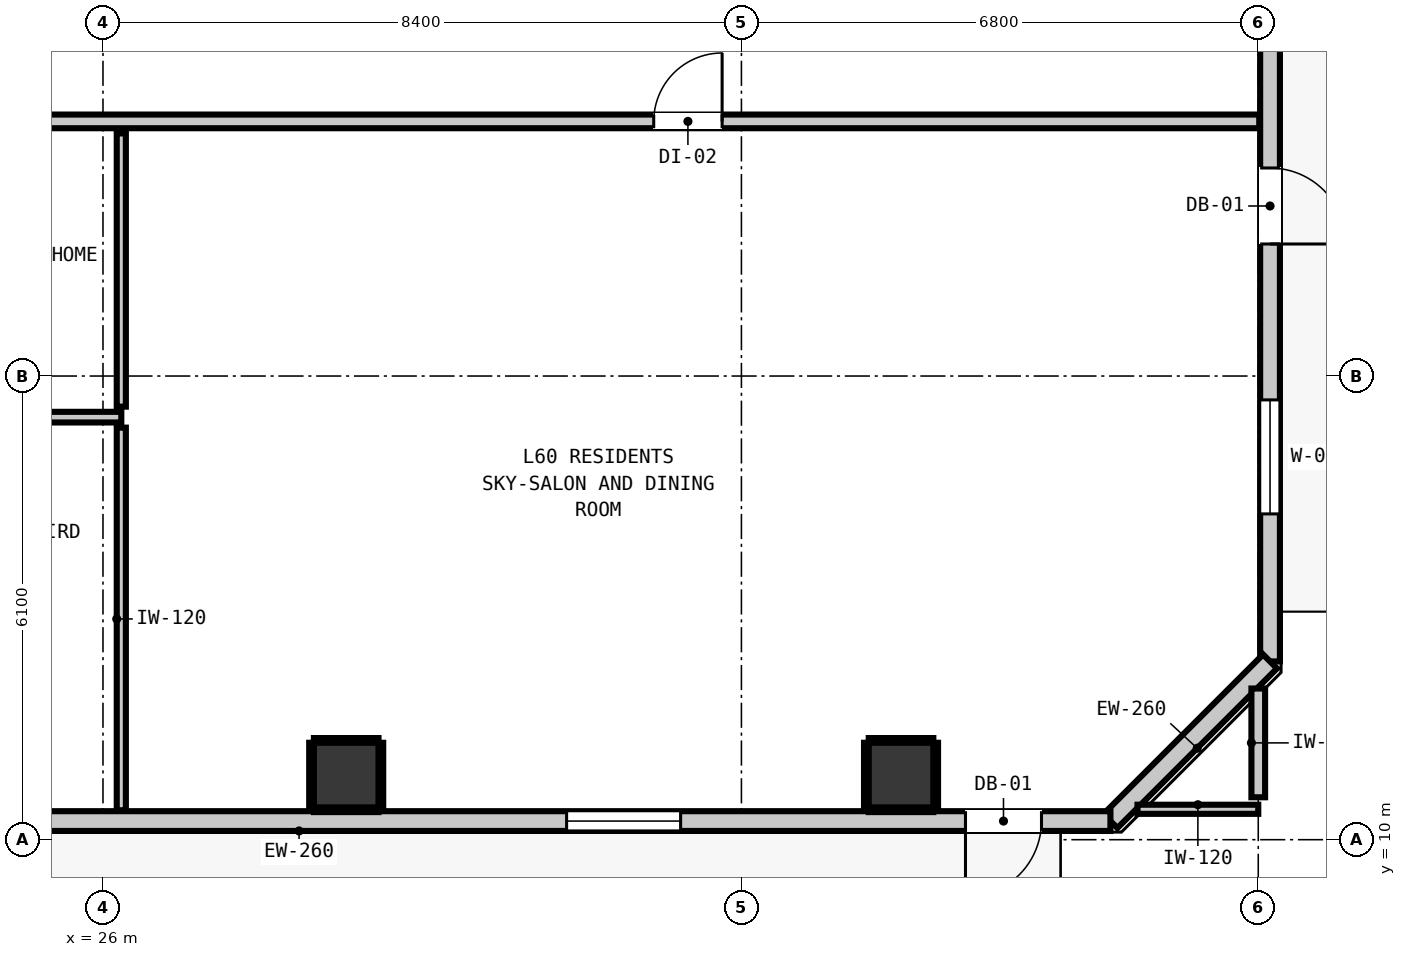
"""IFC4 building model, lengths in metres.
Left out: names, types, materials, properties, quantities, classifications, styles, units other than length and angle.
Written with IfcOpenShell. Run it as: python <this file> out.ifc"""

import sys

from ifc_helpers import new_model, si_unit, direction, frame, frame_2d, origin, origin_2d, place, context, subcontext, project, spatial, rectangle, extrude, element, fill, save


model = new_model("IFC4")
c1 = context("Model", 3, precision=1e-05, world=origin(), true_north=direction((0.0, 1.0)))
c2 = subcontext(c1, "Body", "Model", "MODEL_VIEW")
j1 = project(units=[si_unit("LENGTHUNIT", "METRE"), si_unit("PLANEANGLEUNIT", "RADIAN")], contexts=[c1])
p1 = place(None, origin())
s1 = spatial("IfcSite", under=j1, at=p1, CompositionType="ELEMENT")
p2 = place(p1, origin())
s2 = spatial("IfcBuilding", under=s1, at=p2, CompositionType="ELEMENT")
p3 = place(p2, frame((0.0, 0.0, 206.76)))
s3 = spatial("IfcBuildingStorey", under=s2, at=p3, CompositionType="ELEMENT", Elevation=206.76)
for number, where, z_axis, x_axis in (
    (1, (29.2, 10.85, 0.0), (0.0, 0.0, 1.0), (1.0, 0.0, 0.0)),
    (2, (36.5, 10.85, 0.0), (0.0, 0.0, 1.0), (1.0, 0.0, 0.0)),
):
    element("IfcColumn", number, at=place(p3, frame(where, z_axis=z_axis, x_axis=x_axis)), inside=s3, PredefinedType="COLUMN", context=c2, shape_type="SweptSolid", body=[
        extrude(rectangle(XDim=0.85, YDim=0.85, at=origin_2d()), origin(), (0.0, 0.0, 1.0), 2.9),
    ])
p4 = place(p3, frame((41.355, 42.655, 0.0), z_axis=(0.0, 0.0, 1.0), x_axis=(0.0, -1.0, 0.0)))
e3 = element("IfcWall", 3, at=p4, inside=s3, PredefinedType="STANDARD", context=c2, shape_type="SweptSolid", body=[
    extrude(rectangle(XDim=30.31, YDim=0.26, at=frame_2d((15.155, 0.0))), origin(), (0.0, 0.0, 1.0), 2.9),
])
p5 = place(p4, frame((23.818, 0.0, 0.0)))
e4 = element("IfcOpeningElement", 4, at=p5, cuts=e3, PredefinedType="OPENING", context=c2, shape_type="SweptSolid", body=[
    extrude(rectangle(XDim=1.0, YDim=2.15, at=frame_2d((0.5, 1.075))), frame((0.0, 0.14, 0.0), z_axis=(0.0, -1.0, 0.0), x_axis=(1.0, 0.0, 0.0)), (0.0, 0.0, 1.0), 0.28),
])
p6 = place(p4, frame((26.869, 0.0, 0.85)))
e5 = element("IfcOpeningElement", 5, at=p6, cuts=e3, PredefinedType="OPENING", context=c2, shape_type="SweptSolid", body=[
    extrude(rectangle(XDim=1.5, YDim=1.8, at=frame_2d((0.75, 0.9))), frame((0.0, 0.14, 0.0), z_axis=(0.0, -1.0, 0.0), x_axis=(1.0, 0.0, 0.0)), (0.0, 0.0, 1.0), 0.28),
])
p7 = place(p3, frame((41.355, 12.345, 0.0), z_axis=(0.0, 0.0, 1.0), x_axis=(-0.707147883682, -0.707065676302, 0.0)))
e6 = element("IfcWall", 6, at=p7, inside=s3, PredefinedType="STANDARD", context=c2, shape_type="SweptSolid", body=[
    extrude(rectangle(XDim=2.97, YDim=0.26, at=frame_2d((1.485, 0.0))), origin(), (0.0, 0.0, 1.0), 2.9),
])
p8 = place(p3, frame((39.255, 10.245, 0.0), z_axis=(0.0, 0.0, 1.0), x_axis=(-1.0, 0.0, 0.0)))
e7 = element("IfcWall", 7, at=p8, inside=s3, PredefinedType="STANDARD", context=c2, shape_type="SweptSolid", body=[
    extrude(rectangle(XDim=32.71, YDim=0.26, at=frame_2d((16.355, 0.0))), origin(), (0.0, 0.0, 1.0), 2.9),
])
p9 = place(p8, frame((0.907, 0.0, 0.0)))
e8 = element("IfcOpeningElement", 8, at=p9, cuts=e7, PredefinedType="OPENING", context=c2, shape_type="SweptSolid", body=[
    extrude(rectangle(XDim=1.0, YDim=2.15, at=frame_2d((0.5, 1.075))), frame((0.0, 0.14, 0.0), z_axis=(0.0, -1.0, 0.0), x_axis=(1.0, 0.0, 0.0)), (0.0, 0.0, 1.0), 0.28),
])
p10 = place(p8, frame((27.179, 0.0, 0.85)))
e9 = element("IfcOpeningElement", 9, at=p10, cuts=e7, PredefinedType="OPENING", context=c2, shape_type="SweptSolid", body=[
    extrude(rectangle(XDim=1.5, YDim=1.8, at=frame_2d((0.75, 0.9))), frame((0.0, 0.14, 0.0), z_axis=(0.0, -1.0, 0.0), x_axis=(1.0, 0.0, 0.0)), (0.0, 0.0, 1.0), 0.28),
])
p11 = place(p8, frame((30.449, 0.0, 0.85)))
e10 = element("IfcOpeningElement", 10, at=p11, cuts=e7, PredefinedType="OPENING", context=c2, shape_type="SweptSolid", body=[
    extrude(rectangle(XDim=1.5, YDim=1.8, at=frame_2d((0.75, 0.9))), frame((0.0, 0.14, 0.0), z_axis=(0.0, -1.0, 0.0), x_axis=(1.0, 0.0, 0.0)), (0.0, 0.0, 1.0), 0.28),
])
p12 = place(p8, frame((20.233, 0.0, 0.85)))
e11 = element("IfcOpeningElement", 11, at=p12, cuts=e7, PredefinedType="OPENING", context=c2, shape_type="SweptSolid", body=[
    extrude(rectangle(XDim=1.5, YDim=1.8, at=frame_2d((0.75, 0.9))), frame((0.0, 0.14, 0.0), z_axis=(0.0, -1.0, 0.0), x_axis=(1.0, 0.0, 0.0)), (0.0, 0.0, 1.0), 0.28),
])
p13 = place(p8, frame((14.195, 0.0, 0.85)))
e12 = element("IfcOpeningElement", 12, at=p13, cuts=e7, PredefinedType="OPENING", context=c2, shape_type="SweptSolid", body=[
    extrude(rectangle(XDim=1.5, YDim=1.8, at=frame_2d((0.75, 0.9))), frame((0.0, 0.14, 0.0), z_axis=(0.0, -1.0, 0.0), x_axis=(1.0, 0.0, 0.0)), (0.0, 0.0, 1.0), 0.28),
])
p14 = place(p8, frame((5.655, 0.0, 0.85)))
e13 = element("IfcOpeningElement", 13, at=p14, cuts=e7, PredefinedType="OPENING", context=c2, shape_type="SweptSolid", body=[
    extrude(rectangle(XDim=1.5, YDim=1.8, at=frame_2d((0.75, 0.9))), frame((0.0, 0.14, 0.0), z_axis=(0.0, -1.0, 0.0), x_axis=(1.0, 0.0, 0.0)), (0.0, 0.0, 1.0), 0.28),
])
p15 = place(p3, frame((4.587, 19.45, 0.0), z_axis=(0.0, 0.0, 1.0), x_axis=(1.0, 0.0, 0.0)))
e14 = element("IfcWall", 14, at=p15, inside=s3, PredefinedType="PARTITIONING", context=c2, shape_type="SweptSolid", body=[
    extrude(rectangle(XDim=36.626, YDim=0.18, at=frame_2d((18.313, 0.0))), origin(), (0.0, 0.0, 1.0), 2.9),
])
p16 = place(p15, frame((7.096, 0.0, 0.0)))
e15 = element("IfcOpeningElement", 15, at=p16, cuts=e14, PredefinedType="OPENING", context=c2, shape_type="SweptSolid", body=[
    extrude(rectangle(XDim=1.0, YDim=2.15, at=frame_2d((0.5, 1.075))), frame((0.0, 0.1, 0.0), z_axis=(0.0, -1.0, 0.0), x_axis=(1.0, 0.0, 0.0)), (0.0, 0.0, 1.0), 0.2),
])
p17 = place(p15, frame((28.659, 0.0, 0.0)))
e16 = element("IfcOpeningElement", 16, at=p17, cuts=e14, PredefinedType="OPENING", context=c2, shape_type="SweptSolid", body=[
    extrude(rectangle(XDim=0.9, YDim=2.1, at=frame_2d((0.45, 1.05))), frame((0.0, 0.1, 0.0), z_axis=(0.0, -1.0, 0.0), x_axis=(1.0, 0.0, 0.0)), (0.0, 0.0, 1.0), 0.2),
])
p18 = place(p3, frame((16.069, 15.559, 0.0), z_axis=(0.0, 0.0, 1.0), x_axis=(1.0, 0.0, 0.0)))
e17 = element("IfcWall", 17, at=p18, inside=s3, PredefinedType="PARTITIONING", context=c2, shape_type="SweptSolid", body=[
    extrude(rectangle(XDim=10.172, YDim=0.14, at=frame_2d((5.086, 0.0))), origin(), (0.0, 0.0, 1.0), 2.9),
])
p19 = place(p3, frame((39.611, 10.4, 0.0), z_axis=(0.0, 0.0, 1.0), x_axis=(1.0, 0.0, 0.0)))
e18 = element("IfcWall", 18, at=p19, inside=s3, PredefinedType="PARTITIONING", context=c2, shape_type="SweptSolid", body=[
    extrude(rectangle(XDim=1.589, YDim=0.12, at=frame_2d((0.794, 0.0))), origin(), (0.0, 0.0, 1.0), 2.9),
])
p20 = place(p3, frame((41.2, 10.558, 0.0), z_axis=(0.0, 0.0, 1.0), x_axis=(0.0, 1.0, 0.0)))
e19 = element("IfcWall", 19, at=p20, inside=s3, PredefinedType="PARTITIONING", context=c2, shape_type="SweptSolid", body=[
    extrude(rectangle(XDim=1.431, YDim=0.18, at=frame_2d((0.715, 0.0))), origin(), (0.0, 0.0, 1.0), 2.9),
])
p21 = place(p3, frame((26.241, 10.387, 0.0), z_axis=(0.0, 0.0, 1.0), x_axis=(0.0, 1.0, 0.0)))
e20 = element("IfcWall", 20, at=p21, inside=s3, PredefinedType="PARTITIONING", context=c2, shape_type="SweptSolid", body=[
    extrude(rectangle(XDim=5.034, YDim=0.12, at=frame_2d((2.517, 0.0))), origin(), (0.0, 0.0, 1.0), 2.9),
])
p22 = place(p3, frame((26.241, 15.697, 0.0), z_axis=(0.0, 0.0, 1.0), x_axis=(0.0, 1.0, 0.0)))
e21 = element("IfcWall", 21, at=p22, inside=s3, PredefinedType="PARTITIONING", context=c2, shape_type="SweptSolid", body=[
    extrude(rectangle(XDim=3.595, YDim=0.12, at=frame_2d((1.797, 0.0))), origin(), (0.0, 0.0, 1.0), 2.9),
])
for number, where, z_axis, x_axis in (
    (22, (28.775, 10.393, 0.0), (0.0, 0.0, 1.0), (1.0, 0.0, 0.0)),
    (23, (28.775, 11.307, 0.0), (0.0, 0.0, 1.0), (1.0, 0.0, 0.0)),
):
    element("IfcWall", number, at=place(p3, frame(where, z_axis=z_axis, x_axis=x_axis)), inside=s3, PredefinedType="PARTITIONING", context=c2, shape_type="SweptSolid", body=[
        extrude(rectangle(XDim=0.85, YDim=0.06, at=frame_2d((0.425, 0.0))), origin(), (0.0, 0.0, 1.0), 1.45),
    ])
for number, where, z_axis, x_axis in (
    (24, (28.743, 10.425, 0.0), (0.0, 0.0, 1.0), (0.0, 1.0, 0.0)),
    (25, (29.657, 10.425, 0.0), (0.0, 0.0, 1.0), (0.0, 1.0, 0.0)),
):
    element("IfcWall", number, at=place(p3, frame(where, z_axis=z_axis, x_axis=x_axis)), inside=s3, PredefinedType="PARTITIONING", context=c2, shape_type="SweptSolid", body=[
        extrude(rectangle(XDim=0.85, YDim=0.06, at=frame_2d((0.425, 0.0))), origin(), (0.0, 0.0, 1.0), 0.905),
    ])
for number, where, z_axis, x_axis in (
    (26, (36.075, 10.393, 0.0), (0.0, 0.0, 1.0), (1.0, 0.0, 0.0)),
    (27, (36.075, 11.307, 0.0), (0.0, 0.0, 1.0), (1.0, 0.0, 0.0)),
):
    element("IfcWall", number, at=place(p3, frame(where, z_axis=z_axis, x_axis=x_axis)), inside=s3, PredefinedType="PARTITIONING", context=c2, shape_type="SweptSolid", body=[
        extrude(rectangle(XDim=0.85, YDim=0.06, at=frame_2d((0.425, 0.0))), origin(), (0.0, 0.0, 1.0), 1.45),
    ])
for number, where, z_axis, x_axis in (
    (28, (36.043, 10.425, 0.0), (0.0, 0.0, 1.0), (0.0, 1.0, 0.0)),
    (29, (36.957, 10.425, 0.0), (0.0, 0.0, 1.0), (0.0, 1.0, 0.0)),
):
    element("IfcWall", number, at=place(p3, frame(where, z_axis=z_axis, x_axis=x_axis)), inside=s3, PredefinedType="PARTITIONING", context=c2, shape_type="SweptSolid", body=[
        extrude(rectangle(XDim=0.85, YDim=0.06, at=frame_2d((0.425, 0.0))), origin(), (0.0, 0.0, 1.0), 0.905),
    ])
p23 = place(p9, origin())
e30 = element("IfcDoor", 30, at=p23, inside=s3, OperationType="SINGLE_SWING_RIGHT", PredefinedType="DOOR", context=c2, shape_type="SweptSolid", body=[
    extrude(rectangle(XDim=1.0, YDim=2.15, at=frame_2d((0.5, 1.075))), frame((0.0, 0.025, 0.0), z_axis=(0.0, -1.0, 0.0), x_axis=(1.0, 0.0, 0.0)), (0.0, 0.0, 1.0), 0.05),
])
fill(e8, e30)
p24 = place(p5, origin())
e31 = element("IfcDoor", 31, at=p24, inside=s3, OperationType="SINGLE_SWING_RIGHT", PredefinedType="DOOR", context=c2, shape_type="SweptSolid", body=[
    extrude(rectangle(XDim=1.0, YDim=2.15, at=frame_2d((0.5, 1.075))), frame((0.0, 0.025, 0.0), z_axis=(0.0, -1.0, 0.0), x_axis=(1.0, 0.0, 0.0)), (0.0, 0.0, 1.0), 0.05),
])
fill(e4, e31)
p25 = place(p6, origin())
e32 = element("IfcWindow", 32, at=p25, inside=s3, PartitioningType="SINGLE_PANEL", PredefinedType="WINDOW", context=c2, shape_type="SweptSolid", body=[
    extrude(rectangle(XDim=1.5, YDim=1.8, at=frame_2d((0.75, 0.9))), frame((0.0, 0.03, 0.0), z_axis=(0.0, -1.0, 0.0), x_axis=(1.0, 0.0, 0.0)), (0.0, 0.0, 1.0), 0.06),
])
fill(e5, e32)
p26 = place(p14, origin())
e33 = element("IfcWindow", 33, at=p26, inside=s3, PartitioningType="SINGLE_PANEL", PredefinedType="WINDOW", context=c2, shape_type="SweptSolid", body=[
    extrude(rectangle(XDim=1.5, YDim=1.8, at=frame_2d((0.75, 0.9))), frame((0.0, 0.03, 0.0), z_axis=(0.0, -1.0, 0.0), x_axis=(1.0, 0.0, 0.0)), (0.0, 0.0, 1.0), 0.06),
])
fill(e13, e33)
p27 = place(p17, origin())
e34 = element("IfcDoor", 34, at=p27, inside=s3, OperationType="SINGLE_SWING_RIGHT", PredefinedType="DOOR", context=c2, shape_type="SweptSolid", body=[
    extrude(rectangle(XDim=0.9, YDim=2.1, at=frame_2d((0.45, 1.05))), frame((0.0, 0.025, 0.0), z_axis=(0.0, -1.0, 0.0), x_axis=(1.0, 0.0, 0.0)), (0.0, 0.0, 1.0), 0.05),
])
fill(e16, e34)
save(model, sys.argv[1])
